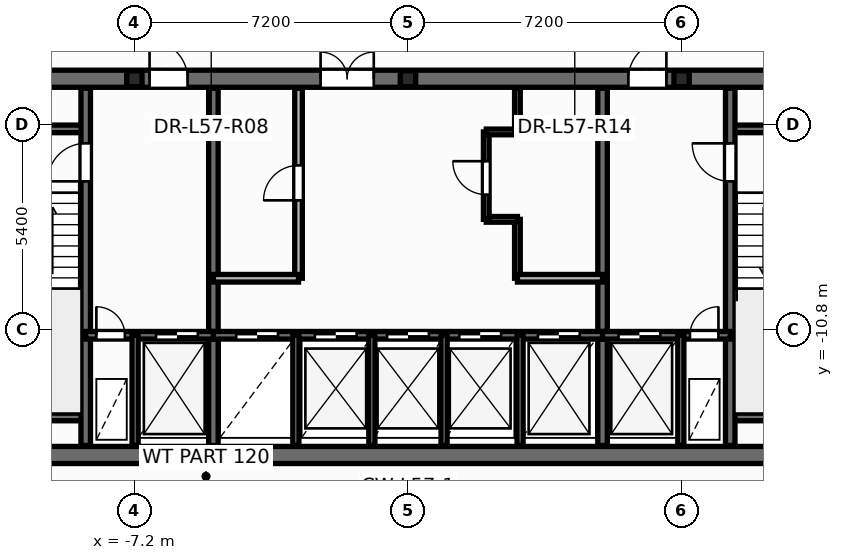
"""IFC4 building model, lengths in metres.
Left out: names, types, materials, properties, quantities, classifications, styles, units other than length and angle.
Written with IfcOpenShell. Run it as: python <this file> out.ifc"""

import sys

from ifc_helpers import new_model, si_unit, direction, frame, frame_2d, origin, origin_2d, place, context, subcontext, project, spatial, rectangle, i_section, extrude, element, fill, save


model = new_model("IFC4")
c1 = context("Model", 3, precision=1e-05, world=origin(), true_north=direction((0.0, 1.0)))
c2 = subcontext(c1, "Body", "Model", "MODEL_VIEW")
j1 = project(units=[si_unit("LENGTHUNIT", "METRE"), si_unit("PLANEANGLEUNIT", "RADIAN")], contexts=[c1])
p1 = place(None, origin())
s1 = spatial("IfcSite", under=j1, at=p1, CompositionType="ELEMENT")
p2 = place(p1, origin())
s2 = spatial("IfcBuilding", under=s1, at=p2, CompositionType="ELEMENT")
p3 = place(p2, frame((0.0, 0.0, 218.1)))
s3 = spatial("IfcBuildingStorey", under=s2, at=p3, CompositionType="ELEMENT", Elevation=218.1)
for number, where, z_axis, x_axis in (
    (1, (-7.2, -4.2, 0.0), (0.0, 0.0, 1.0), (1.0, 0.0, 0.0)),
    (2, (0.0, -4.2, 0.0), (0.0, 0.0, 1.0), (1.0, 0.0, 0.0)),
    (3, (7.2, -4.2, 0.0), (0.0, 0.0, 1.0), (1.0, 0.0, 0.0)),
):
    element("IfcColumn", number, at=place(p3, frame(where, z_axis=z_axis, x_axis=x_axis)), inside=s3, PredefinedType="PILASTER", context=c2, shape_type="SweptSolid", body=[
        extrude(i_section(OverallWidth=0.405, OverallDepth=0.414, WebThickness=0.022, FlangeThickness=0.032, at=origin_2d()), origin(), (0.0, 0.0, 1.0), 3.6),
    ])
p4 = place(p3, frame((2.88, -9.45, 0.0), z_axis=(0.0, 0.0, 1.0), x_axis=(0.0, 1.0, 0.0)))
e4 = element("IfcWall", 4, at=p4, inside=s3, PredefinedType="PARTITIONING", context=c2, shape_type="SweptSolid", body=[
    extrude(rectangle(XDim=1.55, YDim=0.15, at=frame_2d((0.775, 0.0))), origin(), (0.0, 0.0, 1.0), 3.345),
])
p5 = place(p3, frame((2.06, -7.9, 0.0), z_axis=(0.0, 0.0, 1.0), x_axis=(1.0, 0.0, 0.0)))
e5 = element("IfcWall", 5, at=p5, inside=s3, PredefinedType="PARTITIONING", context=c2, shape_type="SweptSolid", body=[
    extrude(rectangle(XDim=0.82, YDim=0.15, at=frame_2d((0.41, 0.0))), origin(), (0.0, 0.0, 1.0), 3.345),
])
p6 = place(p3, frame((2.06, -7.9, 0.0), z_axis=(0.0, 0.0, 1.0), x_axis=(0.0, 1.0, 0.0)))
e6 = element("IfcWall", 6, at=p6, inside=s3, PredefinedType="PARTITIONING", context=c2, shape_type="SweptSolid", body=[
    extrude(rectangle(XDim=2.3, YDim=0.15, at=frame_2d((1.15, 0.0))), origin(), (0.0, 0.0, 1.0), 3.345),
])
p7 = place(p6, frame((0.65, 0.0, 0.0)))
e7 = element("IfcOpeningElement", 7, at=p7, cuts=e6, PredefinedType="OPENING", context=c2, shape_type="SweptSolid", body=[
    extrude(rectangle(XDim=0.886, YDim=2.104, at=frame_2d((0.44, 1.052))), frame((0.0, 0.085, 0.0), z_axis=(0.0, -1.0, 0.0), x_axis=(1.0, 0.0, 0.0)), (0.0, 0.0, 1.0), 0.17),
])
p8 = place(p3, frame((2.06, -5.6, 0.0), z_axis=(0.0, 0.0, 1.0), x_axis=(1.0, 0.0, 0.0)))
e8 = element("IfcWall", 8, at=p8, inside=s3, PredefinedType="PARTITIONING", context=c2, shape_type="SweptSolid", body=[
    extrude(rectangle(XDim=0.82, YDim=0.15, at=frame_2d((0.41, 0.0))), origin(), (0.0, 0.0, 1.0), 3.345),
])
p9 = place(p3, frame((2.88, -5.6, 0.0), z_axis=(0.0, 0.0, 1.0), x_axis=(0.0, 1.0, 0.0)))
e9 = element("IfcWall", 9, at=p9, inside=s3, PredefinedType="PARTITIONING", context=c2, shape_type="SweptSolid", body=[
    extrude(rectangle(XDim=1.15, YDim=0.15, at=frame_2d((0.575, 0.0))), origin(), (0.0, 0.0, 1.0), 3.345),
])
p10 = place(p3, frame((-12.65, -14.1, 0.0), z_axis=(0.0, 0.0, 1.0), x_axis=(1.0, 0.0, 0.0)))
e10 = element("IfcWall", 10, at=p10, inside=s3, PredefinedType="SHEAR", context=c2, shape_type="SweptSolid", body=[
    extrude(rectangle(XDim=25.3, YDim=0.45, at=frame_2d((12.65, 0.0))), origin(), (0.0, 0.0, 1.0), 3.6),
])
p11 = place(p3, frame((-12.65, -4.2, 0.0), z_axis=(0.0, 0.0, 1.0), x_axis=(1.0, 0.0, 0.0)))
e11 = element("IfcWall", 11, at=p11, inside=s3, PredefinedType="SHEAR", context=c2, shape_type="SweptSolid", body=[
    extrude(rectangle(XDim=25.3, YDim=0.45, at=frame_2d((12.65, 0.0))), origin(), (0.0, 0.0, 1.0), 3.6),
])
p12 = place(p11, frame((1.85, 0.0, 0.0)))
e12 = element("IfcOpeningElement", 12, at=p12, cuts=e11, PredefinedType="OPENING", context=c2, shape_type="SweptSolid", body=[
    extrude(rectangle(XDim=0.756, YDim=2.054, at=frame_2d((0.375, 1.027))), frame((0.0, 0.235, 0.0), z_axis=(0.0, -1.0, 0.0), x_axis=(1.0, 0.0, 0.0)), (0.0, 0.0, 1.0), 0.47),
])
p13 = place(p11, frame((22.65, 0.0, 0.0)))
e13 = element("IfcOpeningElement", 13, at=p13, cuts=e11, PredefinedType="OPENING", context=c2, shape_type="SweptSolid", body=[
    extrude(rectangle(XDim=0.756, YDim=2.054, at=frame_2d((0.375, 1.027))), frame((0.0, 0.235, 0.0), z_axis=(0.0, -1.0, 0.0), x_axis=(1.0, 0.0, 0.0)), (0.0, 0.0, 1.0), 0.47),
])
p14 = place(p11, frame((5.85, 0.0, 0.0)))
e14 = element("IfcOpeningElement", 14, at=p14, cuts=e11, PredefinedType="OPENING", context=c2, shape_type="SweptSolid", body=[
    extrude(rectangle(XDim=1.006, YDim=2.104, at=frame_2d((0.5, 1.052))), frame((0.0, 0.235, 0.0), z_axis=(0.0, -1.0, 0.0), x_axis=(1.0, 0.0, 0.0)), (0.0, 0.0, 1.0), 0.47),
])
p15 = place(p11, frame((10.35, 0.0, 0.0)))
e15 = element("IfcOpeningElement", 15, at=p15, cuts=e11, PredefinedType="OPENING", context=c2, shape_type="SweptSolid", body=[
    extrude(rectangle(XDim=1.406, YDim=2.154, at=frame_2d((0.7, 1.077))), frame((0.0, 0.235, 0.0), z_axis=(0.0, -1.0, 0.0), x_axis=(1.0, 0.0, 0.0)), (0.0, 0.0, 1.0), 0.47),
])
p16 = place(p11, frame((18.45, 0.0, 0.0)))
e16 = element("IfcOpeningElement", 16, at=p16, cuts=e11, PredefinedType="OPENING", context=c2, shape_type="SweptSolid", body=[
    extrude(rectangle(XDim=1.006, YDim=2.104, at=frame_2d((0.5, 1.052))), frame((0.0, 0.235, 0.0), z_axis=(0.0, -1.0, 0.0), x_axis=(1.0, 0.0, 0.0)), (0.0, 0.0, 1.0), 0.47),
])
for number, where, z_axis, x_axis in (
    (17, (-12.35, -5.52, 0.0), (0.0, 0.0, 1.0), (1.0, 0.0, 0.0)),
    (18, (-12.35, -13.1, 0.0), (0.0, 0.0, 1.0), (1.0, 0.0, 0.0)),
    (19, (8.48, -5.52, 0.0), (0.0, 0.0, 1.0), (1.0, 0.0, 0.0)),
    (20, (8.48, -13.1, 0.0), (0.0, 0.0, 1.0), (1.0, 0.0, 0.0)),
):
    element("IfcWall", number, at=place(p3, frame(where, z_axis=z_axis, x_axis=x_axis)), inside=s3, PredefinedType="SOLIDWALL", context=c2, shape_type="SweptSolid", body=[
        extrude(rectangle(XDim=3.87, YDim=0.2, at=frame_2d((1.935, 0.0))), origin(), (0.0, 0.0, 1.0), 3.6),
    ])
p17 = place(p3, frame((-8.48, -13.85, 0.0), z_axis=(0.0, 0.0, 1.0), x_axis=(0.0, 1.0, 0.0)))
e21 = element("IfcWall", 21, at=p17, inside=s3, PredefinedType="SHEAR", context=c2, shape_type="SweptSolid", body=[
    extrude(rectangle(XDim=9.4, YDim=0.25, at=frame_2d((4.7, 0.0))), origin(), (0.0, 0.0, 1.0), 3.6),
])
p18 = place(p17, frame((6.95, 0.0, 0.0)))
e22 = element("IfcOpeningElement", 22, at=p18, cuts=e21, PredefinedType="OPENING", context=c2, shape_type="SweptSolid", body=[
    extrude(rectangle(XDim=1.006, YDim=2.104, at=frame_2d((0.5, 1.052))), frame((0.0, 0.135, 0.0), z_axis=(0.0, -1.0, 0.0), x_axis=(1.0, 0.0, 0.0)), (0.0, 0.0, 1.0), 0.27),
])
p19 = place(p3, frame((8.48, -13.85, 0.0), z_axis=(0.0, 0.0, 1.0), x_axis=(0.0, 1.0, 0.0)))
e23 = element("IfcWall", 23, at=p19, inside=s3, PredefinedType="SHEAR", context=c2, shape_type="SweptSolid", body=[
    extrude(rectangle(XDim=9.4, YDim=0.25, at=frame_2d((4.7, 0.0))), origin(), (0.0, 0.0, 1.0), 3.6),
])
p20 = place(p19, frame((6.95, 0.0, 0.0)))
e24 = element("IfcOpeningElement", 24, at=p20, cuts=e23, PredefinedType="OPENING", context=c2, shape_type="SweptSolid", body=[
    extrude(rectangle(XDim=1.006, YDim=2.104, at=frame_2d((0.5, 1.052))), frame((0.0, 0.135, 0.0), z_axis=(0.0, -1.0, 0.0), x_axis=(1.0, 0.0, 0.0)), (0.0, 0.0, 1.0), 0.27),
])
for number, where, z_axis, x_axis in (
    (25, (-5.12, -13.85, 0.0), (0.0, 0.0, 1.0), (0.0, 1.0, 0.0)),
    (26, (5.12, -13.85, 0.0), (0.0, 0.0, 1.0), (0.0, 1.0, 0.0)),
):
    element("IfcWall", number, at=place(p3, frame(where, z_axis=z_axis, x_axis=x_axis)), inside=s3, PredefinedType="SHEAR", context=c2, shape_type="SweptSolid", body=[
        extrude(rectangle(XDim=9.4, YDim=0.25, at=frame_2d((4.7, 0.0))), origin(), (0.0, 0.0, 1.0), 3.6),
    ])
p21 = place(p3, frame((-8.48, -10.95, 0.0), z_axis=(0.0, 0.0, 1.0), x_axis=(1.0, 0.0, 0.0)))
e27 = element("IfcWall", 27, at=p21, inside=s3, PredefinedType="SOLIDWALL", context=c2, shape_type="SweptSolid", body=[
    extrude(rectangle(XDim=3.36, YDim=0.2, at=frame_2d((1.68, 0.0))), origin(), (0.0, 0.0, 1.0), 3.6),
])
p22 = place(p21, frame((0.28, 0.0, 0.0)))
e28 = element("IfcOpeningElement", 28, at=p22, cuts=e27, PredefinedType="OPENING", context=c2, shape_type="SweptSolid", body=[
    extrude(rectangle(XDim=0.756, YDim=2.054, at=frame_2d((0.375, 1.027))), frame((0.0, 0.11, 0.0), z_axis=(0.0, -1.0, 0.0), x_axis=(1.0, 0.0, 0.0)), (0.0, 0.0, 1.0), 0.22),
])
p23 = place(p21, frame((1.85, 0.0, 0.0)))
e29 = element("IfcOpeningElement", 29, at=p23, cuts=e27, PredefinedType="OPENING", context=c2, shape_type="SweptSolid", body=[
    extrude(rectangle(XDim=1.106, YDim=2.104, at=frame_2d((0.55, 1.052))), frame((0.0, 0.11, 0.0), z_axis=(0.0, -1.0, 0.0), x_axis=(1.0, 0.0, 0.0)), (0.0, 0.0, 1.0), 0.22),
])
p24 = place(p3, frame((-5.12, -10.95, 0.0), z_axis=(0.0, 0.0, 1.0), x_axis=(1.0, 0.0, 0.0)))
e30 = element("IfcWall", 30, at=p24, inside=s3, PredefinedType="SOLIDWALL", context=c2, shape_type="SweptSolid", body=[
    extrude(rectangle(XDim=10.24, YDim=0.2, at=frame_2d((5.12, 0.0))), origin(), (0.0, 0.0, 1.0), 3.6),
])
p25 = place(p24, frame((0.6, 0.0, 0.0)))
e31 = element("IfcOpeningElement", 31, at=p25, cuts=e30, PredefinedType="OPENING", context=c2, shape_type="SweptSolid", body=[
    extrude(rectangle(XDim=1.106, YDim=2.104, at=frame_2d((0.55, 1.052))), frame((0.0, 0.11, 0.0), z_axis=(0.0, -1.0, 0.0), x_axis=(1.0, 0.0, 0.0)), (0.0, 0.0, 1.0), 0.22),
])
p26 = place(p24, frame((2.67, 0.0, 0.0)))
e32 = element("IfcOpeningElement", 32, at=p26, cuts=e30, PredefinedType="OPENING", context=c2, shape_type="SweptSolid", body=[
    extrude(rectangle(XDim=1.106, YDim=2.104, at=frame_2d((0.55, 1.052))), frame((0.0, 0.11, 0.0), z_axis=(0.0, -1.0, 0.0), x_axis=(1.0, 0.0, 0.0)), (0.0, 0.0, 1.0), 0.22),
])
p27 = place(p24, frame((4.57, 0.0, 0.0)))
e33 = element("IfcOpeningElement", 33, at=p27, cuts=e30, PredefinedType="OPENING", context=c2, shape_type="SweptSolid", body=[
    extrude(rectangle(XDim=1.106, YDim=2.104, at=frame_2d((0.55, 1.052))), frame((0.0, 0.11, 0.0), z_axis=(0.0, -1.0, 0.0), x_axis=(1.0, 0.0, 0.0)), (0.0, 0.0, 1.0), 0.22),
])
p28 = place(p24, frame((6.47, 0.0, 0.0)))
e34 = element("IfcOpeningElement", 34, at=p28, cuts=e30, PredefinedType="OPENING", context=c2, shape_type="SweptSolid", body=[
    extrude(rectangle(XDim=1.106, YDim=2.104, at=frame_2d((0.55, 1.052))), frame((0.0, 0.11, 0.0), z_axis=(0.0, -1.0, 0.0), x_axis=(1.0, 0.0, 0.0)), (0.0, 0.0, 1.0), 0.22),
])
p29 = place(p24, frame((8.54, 0.0, 0.0)))
e35 = element("IfcOpeningElement", 35, at=p29, cuts=e30, PredefinedType="OPENING", context=c2, shape_type="SweptSolid", body=[
    extrude(rectangle(XDim=1.106, YDim=2.104, at=frame_2d((0.55, 1.052))), frame((0.0, 0.11, 0.0), z_axis=(0.0, -1.0, 0.0), x_axis=(1.0, 0.0, 0.0)), (0.0, 0.0, 1.0), 0.22),
])
p30 = place(p3, frame((5.12, -10.95, 0.0), z_axis=(0.0, 0.0, 1.0), x_axis=(1.0, 0.0, 0.0)))
e36 = element("IfcWall", 36, at=p30, inside=s3, PredefinedType="SOLIDWALL", context=c2, shape_type="SweptSolid", body=[
    extrude(rectangle(XDim=3.36, YDim=0.2, at=frame_2d((1.68, 0.0))), origin(), (0.0, 0.0, 1.0), 3.6),
])
p31 = place(p30, frame((0.42, 0.0, 0.0)))
e37 = element("IfcOpeningElement", 37, at=p31, cuts=e36, PredefinedType="OPENING", context=c2, shape_type="SweptSolid", body=[
    extrude(rectangle(XDim=1.106, YDim=2.104, at=frame_2d((0.55, 1.052))), frame((0.0, 0.11, 0.0), z_axis=(0.0, -1.0, 0.0), x_axis=(1.0, 0.0, 0.0)), (0.0, 0.0, 1.0), 0.22),
])
p32 = place(p30, frame((2.3, 0.0, 0.0)))
e38 = element("IfcOpeningElement", 38, at=p32, cuts=e36, PredefinedType="OPENING", context=c2, shape_type="SweptSolid", body=[
    extrude(rectangle(XDim=0.756, YDim=2.054, at=frame_2d((0.375, 1.027))), frame((0.0, 0.11, 0.0), z_axis=(0.0, -1.0, 0.0), x_axis=(1.0, 0.0, 0.0)), (0.0, 0.0, 1.0), 0.22),
])
for number, where, z_axis, x_axis in (
    (39, (-7.18, -13.85, 0.0), (0.0, 0.0, 1.0), (0.0, 1.0, 0.0)),
    (40, (7.18, -13.85, 0.0), (0.0, 0.0, 1.0), (0.0, 1.0, 0.0)),
    (41, (-2.95, -13.85, 0.0), (0.0, 0.0, 1.0), (0.0, 1.0, 0.0)),
    (42, (2.95, -13.85, 0.0), (0.0, 0.0, 1.0), (0.0, 1.0, 0.0)),
):
    element("IfcWall", number, at=place(p3, frame(where, z_axis=z_axis, x_axis=x_axis)), inside=s3, PredefinedType="PARTITIONING", context=c2, shape_type="SweptSolid", body=[
        extrude(rectangle(XDim=2.9, YDim=0.16, at=frame_2d((1.45, 0.0))), origin(), (0.0, 0.0, 1.0), 2.47),
    ])
p33 = place(p3, frame((-2.88, -9.45, 0.0), z_axis=(0.0, 0.0, 1.0), x_axis=(0.0, 1.0, 0.0)))
e43 = element("IfcWall", 43, at=p33, inside=s3, PredefinedType="SOLIDWALL", context=c2, shape_type="SweptSolid", body=[
    extrude(rectangle(XDim=5.0, YDim=0.2, at=frame_2d((2.5, 0.0))), origin(), (0.0, 0.0, 1.0), 3.345),
])
p34 = place(p33, frame((2.05, 0.0, 0.0)))
e44 = element("IfcOpeningElement", 44, at=p34, cuts=e43, PredefinedType="OPENING", context=c2, shape_type="SweptSolid", body=[
    extrude(rectangle(XDim=0.926, YDim=2.104, at=frame_2d((0.46, 1.052))), frame((0.0, 0.11, 0.0), z_axis=(0.0, -1.0, 0.0), x_axis=(1.0, 0.0, 0.0)), (0.0, 0.0, 1.0), 0.22),
])
for number, where, z_axis, x_axis in (
    (45, (-5.12, -9.45, 0.0), (0.0, 0.0, 1.0), (1.0, 0.0, 0.0)),
    (46, (2.88, -9.45, 0.0), (0.0, 0.0, 1.0), (1.0, 0.0, 0.0)),
):
    element("IfcWall", number, at=place(p3, frame(where, z_axis=z_axis, x_axis=x_axis)), inside=s3, PredefinedType="SOLIDWALL", context=c2, shape_type="SweptSolid", body=[
        extrude(rectangle(XDim=2.24, YDim=0.2, at=frame_2d((1.12, 0.0))), origin(), (0.0, 0.0, 1.0), 3.345),
    ])
for number, where, z_axis, x_axis in (
    (47, (-0.95, -13.85, 0.0), (0.0, 0.0, 1.0), (0.0, 1.0, 0.0)),
    (48, (0.95, -13.85, 0.0), (0.0, 0.0, 1.0), (0.0, 1.0, 0.0)),
):
    element("IfcWall", number, at=place(p3, frame(where, z_axis=z_axis, x_axis=x_axis)), inside=s3, PredefinedType="PARTITIONING", context=c2, shape_type="SweptSolid", body=[
        extrude(rectangle(XDim=2.9, YDim=0.16, at=frame_2d((1.45, 0.0))), origin(), (0.0, 0.0, 1.0), 2.47),
    ])
p35 = place(p34, origin())
e49 = element("IfcDoor", 49, at=p35, inside=s3, OperationType="SINGLE_SWING_LEFT", PredefinedType="DOOR", context=c2, shape_type="SweptSolid", body=[
    extrude(rectangle(XDim=0.92, YDim=2.1, at=frame_2d((0.46, 1.05))), frame((0.0, 0.025, 0.0), z_axis=(0.0, -1.0, 0.0), x_axis=(1.0, 0.0, 0.0)), (0.0, 0.0, 1.0), 0.05),
])
fill(e44, e49)
p36 = place(p7, origin())
e50 = element("IfcDoor", 50, at=p36, inside=s3, OperationType="SINGLE_SWING_RIGHT", PredefinedType="DOOR", context=c2, shape_type="SweptSolid", body=[
    extrude(rectangle(XDim=0.88, YDim=2.1, at=frame_2d((0.44, 1.05))), frame((0.0, 0.025, 0.0), z_axis=(0.0, -1.0, 0.0), x_axis=(1.0, 0.0, 0.0)), (0.0, 0.0, 1.0), 0.05),
])
fill(e7, e50)
p37 = place(p18, origin())
e51 = element("IfcDoor", 51, at=p37, inside=s3, OperationType="SINGLE_SWING_LEFT", PredefinedType="DOOR", context=c2, shape_type="SweptSolid", body=[
    extrude(rectangle(XDim=1.0, YDim=2.1, at=frame_2d((0.5, 1.05))), frame((0.0, 0.025, 0.0), z_axis=(0.0, -1.0, 0.0), x_axis=(1.0, 0.0, 0.0)), (0.0, 0.0, 1.0), 0.05),
])
fill(e22, e51)
p38 = place(p20, origin())
e52 = element("IfcDoor", 52, at=p38, inside=s3, OperationType="SINGLE_SWING_RIGHT", PredefinedType="DOOR", context=c2, shape_type="SweptSolid", body=[
    extrude(rectangle(XDim=1.0, YDim=2.1, at=frame_2d((0.5, 1.05))), frame((0.0, 0.025, 0.0), z_axis=(0.0, -1.0, 0.0), x_axis=(1.0, 0.0, 0.0)), (0.0, 0.0, 1.0), 0.05),
])
fill(e24, e52)
p39 = place(p22, origin())
e53 = element("IfcDoor", 53, at=p39, inside=s3, OperationType="SINGLE_SWING_LEFT", PredefinedType="DOOR", context=c2, shape_type="SweptSolid", body=[
    extrude(rectangle(XDim=0.75, YDim=2.05, at=frame_2d((0.375, 1.025))), frame((0.0, 0.025, 0.0), z_axis=(0.0, -1.0, 0.0), x_axis=(1.0, 0.0, 0.0)), (0.0, 0.0, 1.0), 0.05),
])
fill(e28, e53)
p40 = place(p23, origin())
e54 = element("IfcDoor", 54, at=p40, inside=s3, OperationType="DOUBLE_DOOR_SLIDING", PredefinedType="DOOR", context=c2, shape_type="SweptSolid", body=[
    extrude(rectangle(XDim=1.1, YDim=2.1, at=frame_2d((0.55, 1.05))), frame((0.0, 0.025, 0.0), z_axis=(0.0, -1.0, 0.0), x_axis=(1.0, 0.0, 0.0)), (0.0, 0.0, 1.0), 0.05),
])
fill(e29, e54)
p41 = place(p31, origin())
e55 = element("IfcDoor", 55, at=p41, inside=s3, OperationType="DOUBLE_DOOR_SLIDING", PredefinedType="DOOR", context=c2, shape_type="SweptSolid", body=[
    extrude(rectangle(XDim=1.1, YDim=2.1, at=frame_2d((0.55, 1.05))), frame((0.0, 0.025, 0.0), z_axis=(0.0, -1.0, 0.0), x_axis=(1.0, 0.0, 0.0)), (0.0, 0.0, 1.0), 0.05),
])
fill(e37, e55)
p42 = place(p32, origin())
e56 = element("IfcDoor", 56, at=p42, inside=s3, OperationType="SINGLE_SWING_RIGHT", PredefinedType="DOOR", context=c2, shape_type="SweptSolid", body=[
    extrude(rectangle(XDim=0.75, YDim=2.05, at=frame_2d((0.375, 1.025))), frame((0.0, 0.025, 0.0), z_axis=(0.0, -1.0, 0.0), x_axis=(1.0, 0.0, 0.0)), (0.0, 0.0, 1.0), 0.05),
])
fill(e38, e56)
p43 = place(p25, origin())
e57 = element("IfcDoor", 57, at=p43, inside=s3, OperationType="DOUBLE_DOOR_SLIDING", PredefinedType="DOOR", context=c2, shape_type="SweptSolid", body=[
    extrude(rectangle(XDim=1.1, YDim=2.1, at=frame_2d((0.55, 1.05))), frame((0.0, 0.025, 0.0), z_axis=(0.0, -1.0, 0.0), x_axis=(1.0, 0.0, 0.0)), (0.0, 0.0, 1.0), 0.05),
])
fill(e31, e57)
p44 = place(p26, origin())
e58 = element("IfcDoor", 58, at=p44, inside=s3, OperationType="DOUBLE_DOOR_SLIDING", PredefinedType="DOOR", context=c2, shape_type="SweptSolid", body=[
    extrude(rectangle(XDim=1.1, YDim=2.1, at=frame_2d((0.55, 1.05))), frame((0.0, 0.025, 0.0), z_axis=(0.0, -1.0, 0.0), x_axis=(1.0, 0.0, 0.0)), (0.0, 0.0, 1.0), 0.05),
])
fill(e32, e58)
p45 = place(p27, origin())
e59 = element("IfcDoor", 59, at=p45, inside=s3, OperationType="DOUBLE_DOOR_SLIDING", PredefinedType="DOOR", context=c2, shape_type="SweptSolid", body=[
    extrude(rectangle(XDim=1.1, YDim=2.1, at=frame_2d((0.55, 1.05))), frame((0.0, 0.025, 0.0), z_axis=(0.0, -1.0, 0.0), x_axis=(1.0, 0.0, 0.0)), (0.0, 0.0, 1.0), 0.05),
])
fill(e33, e59)
p46 = place(p28, origin())
e60 = element("IfcDoor", 60, at=p46, inside=s3, OperationType="DOUBLE_DOOR_SLIDING", PredefinedType="DOOR", context=c2, shape_type="SweptSolid", body=[
    extrude(rectangle(XDim=1.1, YDim=2.1, at=frame_2d((0.55, 1.05))), frame((0.0, 0.025, 0.0), z_axis=(0.0, -1.0, 0.0), x_axis=(1.0, 0.0, 0.0)), (0.0, 0.0, 1.0), 0.05),
])
fill(e34, e60)
p47 = place(p29, origin())
e61 = element("IfcDoor", 61, at=p47, inside=s3, OperationType="DOUBLE_DOOR_SLIDING", PredefinedType="DOOR", context=c2, shape_type="SweptSolid", body=[
    extrude(rectangle(XDim=1.1, YDim=2.1, at=frame_2d((0.55, 1.05))), frame((0.0, 0.025, 0.0), z_axis=(0.0, -1.0, 0.0), x_axis=(1.0, 0.0, 0.0)), (0.0, 0.0, 1.0), 0.05),
])
fill(e35, e61)
p48 = place(p14, origin())
e62 = element("IfcDoor", 62, at=p48, inside=s3, OperationType="SINGLE_SWING_LEFT", PredefinedType="DOOR", context=c2, shape_type="SweptSolid", body=[
    extrude(rectangle(XDim=1.0, YDim=2.1, at=frame_2d((0.5, 1.05))), frame((0.0, 0.025, 0.0), z_axis=(0.0, -1.0, 0.0), x_axis=(1.0, 0.0, 0.0)), (0.0, 0.0, 1.0), 0.05),
])
fill(e14, e62)
p49 = place(p15, origin())
e63 = element("IfcDoor", 63, at=p49, inside=s3, OperationType="DOUBLE_DOOR_SINGLE_SWING", PredefinedType="DOOR", context=c2, shape_type="SweptSolid", body=[
    extrude(rectangle(XDim=1.4, YDim=2.15, at=frame_2d((0.7, 1.075))), frame((0.0, 0.025, 0.0), z_axis=(0.0, -1.0, 0.0), x_axis=(1.0, 0.0, 0.0)), (0.0, 0.0, 1.0), 0.05),
])
fill(e15, e63)
p50 = place(p16, origin())
e64 = element("IfcDoor", 64, at=p50, inside=s3, OperationType="SINGLE_SWING_RIGHT", PredefinedType="DOOR", context=c2, shape_type="SweptSolid", body=[
    extrude(rectangle(XDim=1.0, YDim=2.1, at=frame_2d((0.5, 1.05))), frame((0.0, 0.025, 0.0), z_axis=(0.0, -1.0, 0.0), x_axis=(1.0, 0.0, 0.0)), (0.0, 0.0, 1.0), 0.05),
])
fill(e16, e64)
save(model, sys.argv[1])
